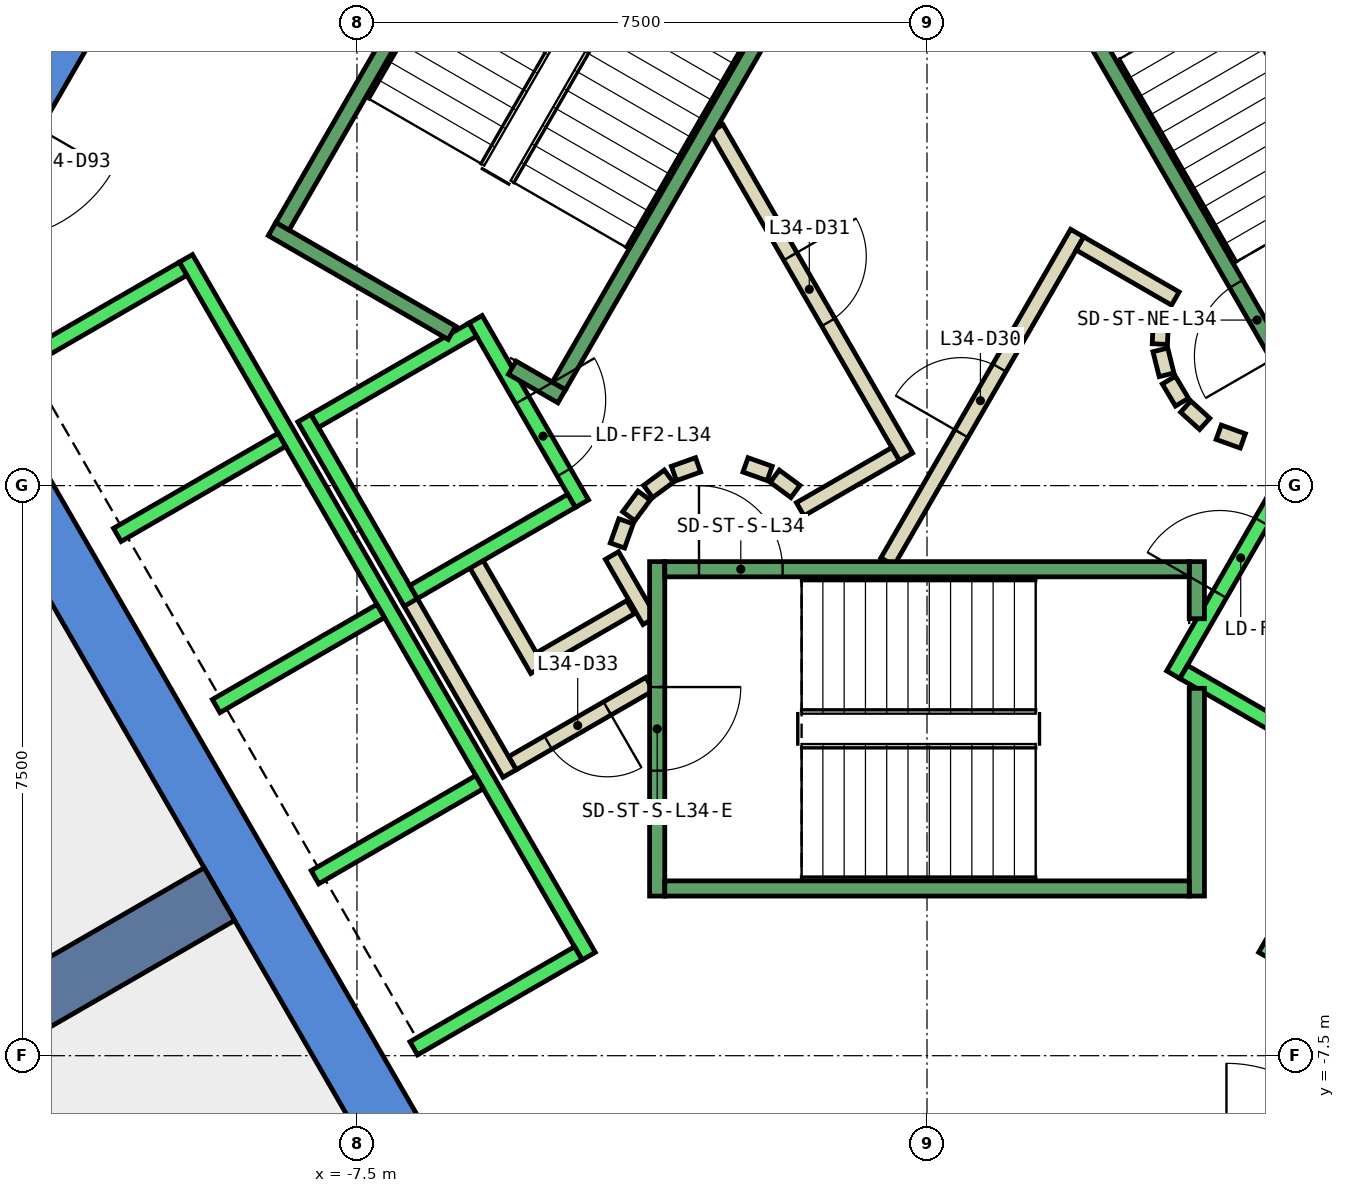
"""IFC4 building model, lengths in metres.
Left out: names, types, materials, properties, quantities, classifications, styles, units other than length and angle.
Written with IfcOpenShell. Run it as: python <this file> out.ifc"""

import sys

from ifc_helpers import new_model, si_unit, direction, frame, frame_2d, origin, place, context, subcontext, project, spatial, polyline, rectangle, outline, extrude, element, fill, save


model = new_model("IFC4")
c1 = context("Model", 3, precision=1e-05, world=origin(), true_north=direction((0.0, 1.0)))
c2 = subcontext(c1, "Body", "Model", "MODEL_VIEW")
j1 = project(units=[si_unit("LENGTHUNIT", "METRE"), si_unit("PLANEANGLEUNIT", "RADIAN")], contexts=[c1])
p1 = place(None, origin())
s1 = spatial("IfcSite", under=j1, at=p1, CompositionType="ELEMENT")
p2 = place(p1, origin())
s2 = spatial("IfcBuilding", under=s1, at=p2, CompositionType="ELEMENT")
p3 = place(p2, frame((0.0, 0.0, 155.0)))
s3 = spatial("IfcBuildingStorey", under=s2, at=p3, CompositionType="ELEMENT", Elevation=155.0)
p4 = place(p3, frame((0.0, 0.0, -0.4)))
e1 = element("IfcWall", 1, at=p4, inside=s3, PredefinedType="SHEAR", context=c2, shape_type="SweptSolid", body=[
    extrude(outline(polyline([(-12.267, 5.252), (-11.575, 4.852), (-6.466, 13.7), (-6.928, 14.5), (-12.267, 5.252)])), origin(), (0.0, 0.0, 1.0), 4.2),
])
p5 = place(p3, frame((0.0, 0.0, -0.4)))
e2 = element("IfcWall", 2, at=p5, inside=s3, PredefinedType="SHEAR", context=c2, shape_type="SweptSolid", body=[
    extrude(outline(polyline([(-13.856, 2.5), (-6.928, -9.5), (-6.466, -8.7), (-12.933, 2.5), (-13.856, 2.5)])), origin(), (0.0, 0.0, 1.0), 4.2),
])
p6 = place(p3, frame((-9.31, -5.375, -0.4), z_axis=(0.0, 0.0, 1.0), x_axis=(-0.866017533419, -0.500013631625, 0.0)))
e3 = element("IfcWall", 3, at=p6, inside=s3, PredefinedType="SHEAR", context=c2, shape_type="SweptSolid", body=[
    extrude(rectangle(XDim=9.0, YDim=0.8, at=frame_2d((4.5, 0.0))), origin(), (0.0, 0.0, 1.0), 4.2),
])
p7 = place(p3, frame((-3.9, -1.599, 0.0), z_axis=(0.0, 0.0, 1.0), x_axis=(-0.865969445389, -0.500096910261, 0.0)))
e4 = element("IfcWall", 4, at=p7, inside=s3, PredefinedType="PARTITIONING", context=c2, shape_type="SweptSolid", body=[
    extrude(rectangle(XDim=1.373, YDim=0.2, at=frame_2d((0.687, 0.0))), origin(), (0.0, 0.0, 1.0), 3.8),
])
p8 = place(p3, frame((-5.126, -2.422, 0.0), z_axis=(0.0, 0.0, 1.0), x_axis=(-0.500062241894, 0.865989465428, 0.0)))
e5 = element("IfcWall", 5, at=p8, inside=s3, PredefinedType="PARTITIONING", context=c2, shape_type="SweptSolid", body=[
    extrude(rectangle(XDim=1.7, YDim=0.2, at=frame_2d((0.85, 0.0))), origin(), (0.0, 0.0, 1.0), 3.8),
])
p9 = place(p3, frame((-3.65, -2.61, 0.0), z_axis=(0.0, 0.0, 1.0), x_axis=(-0.866072462134, -0.499918483688, 0.0)))
e6 = element("IfcWall", 6, at=p9, inside=s3, PredefinedType="PARTITIONING", context=c2, shape_type="SweptSolid", body=[
    extrude(rectangle(XDim=2.084, YDim=0.2, at=frame_2d((1.042, 0.0))), origin(), (0.0, 0.0, 1.0), 3.8),
])
p10 = place(p9, frame((0.642, 0.0, 0.0)))
e7 = element("IfcOpeningElement", 7, at=p10, cuts=e6, PredefinedType="OPENING", context=c2, shape_type="SweptSolid", body=[
    extrude(rectangle(XDim=0.9, YDim=2.1, at=frame_2d((0.45, 1.05))), frame((0.0, 0.11, 0.0), z_axis=(0.0, -1.0, 0.0), x_axis=(1.0, 0.0, 0.0)), (0.0, 0.0, 1.0), 0.22),
])
p11 = place(p3, frame((-5.492, -3.788, 0.0), z_axis=(0.0, 0.0, 1.0), x_axis=(-0.500008949224, 0.866020236886, 0.0)))
e8 = element("IfcWall", 8, at=p11, inside=s3, PredefinedType="PARTITIONING", context=c2, shape_type="SweptSolid", body=[
    extrude(rectangle(XDim=2.68, YDim=0.2, at=frame_2d((1.34, 0.0))), origin(), (0.0, 0.0, 1.0), 3.8),
])
p12 = place(p3, frame((-4.145, -0.92, 0.0), z_axis=(0.0, 0.0, 1.0), x_axis=(0.499743786207, -0.866173278362, 0.0)))
e9 = element("IfcWall", 9, at=p12, inside=s3, PredefinedType="PARTITIONING", context=c2, shape_type="SweptSolid", body=[
    extrude(rectangle(XDim=0.991, YDim=0.2, at=frame_2d((0.495, 0.0))), origin(), (0.0, 0.0, 1.0), 3.8),
])
p13 = place(p3, frame((-0.52, -1.0, 0.0), z_axis=(0.0, 0.0, 1.0), x_axis=(0.50011622646, 0.865958290007, 0.0)))
e10 = element("IfcWall", 10, at=p13, inside=s3, PredefinedType="PARTITIONING", context=c2, shape_type="SweptSolid", body=[
    extrude(rectangle(XDim=4.991, YDim=0.2, at=frame_2d((2.496, 0.0))), origin(), (0.0, 0.0, 1.0), 3.8),
])
p14 = place(p13, frame((1.945, 0.0, 0.0)))
e11 = element("IfcOpeningElement", 11, at=p14, cuts=e10, PredefinedType="OPENING", context=c2, shape_type="SweptSolid", body=[
    extrude(rectangle(XDim=1.0, YDim=2.1, at=frame_2d((0.5, 1.05))), frame((0.0, 0.11, 0.0), z_axis=(0.0, -1.0, 0.0), x_axis=(1.0, 0.0, 0.0)), (0.0, 0.0, 1.0), 0.22),
])
p15 = place(p3, frame((2.012, 3.186, 0.0), z_axis=(0.0, 0.0, 1.0), x_axis=(0.865891012941, -0.500232699559, 0.0)))
e12 = element("IfcWall", 12, at=p15, inside=s3, PredefinedType="PARTITIONING", context=c2, shape_type="SweptSolid", body=[
    extrude(rectangle(XDim=1.449, YDim=0.2, at=frame_2d((0.725, 0.0))), origin(), (0.0, 0.0, 1.0), 3.8),
])
p16 = place(p3, frame((3.079, 2.199, 0.0), z_axis=(0.0, 0.0, 1.0), x_axis=(-0.047771483479, -0.998858290933, 0.0)))
e13 = element("IfcWall", 13, at=p16, inside=s3, PredefinedType="PARTITIONING", context=c2, shape_type="SweptSolid", body=[
    extrude(rectangle(XDim=0.337, YDim=0.2, at=frame_2d((0.169, 0.0))), origin(), (0.0, 0.0, 1.0), 3.8),
])
p17 = place(p3, frame((3.07, 1.786, 0.0), z_axis=(0.0, 0.0, 1.0), x_axis=(0.242705583207, -0.970099994784, 0.0)))
e14 = element("IfcWall", 14, at=p17, inside=s3, PredefinedType="PARTITIONING", context=c2, shape_type="SweptSolid", body=[
    extrude(rectangle(XDim=0.338, YDim=0.2, at=frame_2d((0.169, 0.0))), origin(), (0.0, 0.0, 1.0), 3.8),
])
for number, where, z_axis, x_axis in (
    (15, (3.182, 1.388, 0.0), (0.0, 0.0, 1.0), (0.512, -0.859, 0.0)),
    (16, (3.404, 1.039, 0.0), (0.0, 0.0, 1.0), (0.74, -0.672, 0.0)),
):
    element("IfcWall", number, at=place(p3, frame(where, z_axis=z_axis, x_axis=x_axis)), inside=s3, PredefinedType="PARTITIONING", context=c2, shape_type="SweptSolid", body=[
        extrude(rectangle(XDim=0.338, YDim=0.2, at=frame_2d((0.169, 0.0))), origin(), (0.0, 0.0, 1.0), 3.8),
    ])
p18 = place(p3, frame((3.838, 0.702, 0.0), z_axis=(0.0, 0.0, 1.0), x_axis=(0.941035081519, -0.338308993895, 0.0)))
e17 = element("IfcWall", 17, at=p18, inside=s3, PredefinedType="PARTITIONING", context=c2, shape_type="SweptSolid", body=[
    extrude(rectangle(XDim=0.337, YDim=0.2, at=frame_2d((0.168, 0.0))), origin(), (0.0, 0.0, 1.0), 3.8),
])
p19 = place(p3, frame((-2.771, 4.7, 0.0), z_axis=(0.0, 0.0, 1.0), x_axis=(0.499969479948, -0.866043023828, 0.0)))
e18 = element("IfcWall", 18, at=p19, inside=s3, PredefinedType="PARTITIONING", context=c2, shape_type="SweptSolid", body=[
    extrude(rectangle(XDim=4.99, YDim=0.2, at=frame_2d((2.495, 0.0))), origin(), (0.0, 0.0, 1.0), 3.8),
])
p20 = place(p19, frame((1.945, 0.0, 0.0)))
e19 = element("IfcOpeningElement", 19, at=p20, cuts=e18, PredefinedType="OPENING", context=c2, shape_type="SweptSolid", body=[
    extrude(rectangle(XDim=1.0, YDim=2.1, at=frame_2d((0.5, 1.05))), frame((0.0, 0.11, 0.0), z_axis=(0.0, -1.0, 0.0), x_axis=(1.0, 0.0, 0.0)), (0.0, 0.0, 1.0), 0.22),
])
p21 = place(p3, frame((-0.412, 0.414, 0.0), z_axis=(0.0, 0.0, 1.0), x_axis=(-0.866017369001, -0.500013916395, 0.0)))
e20 = element("IfcWall", 20, at=p21, inside=s3, PredefinedType="PARTITIONING", context=c2, shape_type="SweptSolid", body=[
    extrude(rectangle(XDim=1.45, YDim=0.2, at=frame_2d((0.725, 0.0))), origin(), (0.0, 0.0, 1.0), 3.8),
])
p22 = place(p3, frame((-1.731, -0.077, 0.0), z_axis=(0.0, 0.0, 1.0), x_axis=(-0.804311165252, 0.594208338422, 0.0)))
e21 = element("IfcWall", 21, at=p22, inside=s3, PredefinedType="PARTITIONING", context=c2, shape_type="SweptSolid", body=[
    extrude(rectangle(XDim=0.338, YDim=0.2, at=frame_2d((0.169, 0.0))), origin(), (0.0, 0.0, 1.0), 3.8),
])
p23 = place(p3, frame((-2.07, 0.16, 0.0), z_axis=(0.0, 0.0, 1.0), x_axis=(-0.942199461132, 0.335052496547, 0.0)))
e22 = element("IfcWall", 22, at=p23, inside=s3, PredefinedType="PARTITIONING", context=c2, shape_type="SweptSolid", body=[
    extrude(rectangle(XDim=0.337, YDim=0.2, at=frame_2d((0.169, 0.0))), origin(), (0.0, 0.0, 1.0), 3.8),
])
p24 = place(p3, frame((-3.012, 0.273, 0.0), z_axis=(0.0, 0.0, 1.0), x_axis=(-0.942280615813, -0.334824194261, 0.0)))
e23 = element("IfcWall", 23, at=p24, inside=s3, PredefinedType="PARTITIONING", context=c2, shape_type="SweptSolid", body=[
    extrude(rectangle(XDim=0.338, YDim=0.2, at=frame_2d((0.169, 0.0))), origin(), (0.0, 0.0, 1.0), 3.8),
])
p25 = place(p3, frame((-3.397, 0.124, 0.0), z_axis=(0.0, 0.0, 1.0), x_axis=(-0.804311165252, -0.594208338422, 0.0)))
e24 = element("IfcWall", 24, at=p25, inside=s3, PredefinedType="PARTITIONING", context=c2, shape_type="SweptSolid", body=[
    extrude(rectangle(XDim=0.338, YDim=0.2, at=frame_2d((0.169, 0.0))), origin(), (0.0, 0.0, 1.0), 3.8),
])
p26 = place(p3, frame((-3.723, -0.131, 0.0), z_axis=(0.0, 0.0, 1.0), x_axis=(-0.594675113454, -0.803966112121, 0.0)))
e25 = element("IfcWall", 25, at=p26, inside=s3, PredefinedType="PARTITIONING", context=c2, shape_type="SweptSolid", body=[
    extrude(rectangle(XDim=0.338, YDim=0.2, at=frame_2d((0.169, 0.0))), origin(), (0.0, 0.0, 1.0), 3.8),
])
p27 = place(p3, frame((-3.96, -0.47, 0.0), z_axis=(0.0, 0.0, 1.0), x_axis=(-0.334824194261, -0.942280615813, 0.0)))
e26 = element("IfcWall", 26, at=p27, inside=s3, PredefinedType="PARTITIONING", context=c2, shape_type="SweptSolid", body=[
    extrude(rectangle(XDim=0.338, YDim=0.2, at=frame_2d((0.169, 0.0))), origin(), (0.0, 0.0, 1.0), 3.8),
])
p28 = place(p3, frame((-5.94, 2.188, 0.0), z_axis=(0.0, 0.0, 1.0), x_axis=(0.49994636267, -0.866056369097, 0.0)))
e27 = element("IfcWall", 27, at=p28, inside=s3, PredefinedType="STANDARD", context=c2, shape_type="SweptSolid", body=[
    extrude(rectangle(XDim=2.8, YDim=0.2, at=frame_2d((1.4, 0.0))), origin(), (0.0, 0.0, 1.0), 3.8),
])
p29 = place(p28, frame((1.225, 0.0, 0.0)))
e28 = element("IfcOpeningElement", 28, at=p29, cuts=e27, PredefinedType="OPENING", context=c2, shape_type="SweptSolid", body=[
    extrude(rectangle(XDim=1.1, YDim=2.1, at=frame_2d((0.55, 1.05))), frame((0.0, 0.11, 0.0), z_axis=(0.0, -1.0, 0.0), x_axis=(1.0, 0.0, 0.0)), (0.0, 0.0, 1.0), 0.22),
])
p30 = place(p3, frame((-8.192, 0.888, 0.0), z_axis=(0.0, 0.0, 1.0), x_axis=(0.49994636267, -0.866056369097, 0.0)))
e29 = element("IfcWall", 29, at=p30, inside=s3, PredefinedType="STANDARD", context=c2, shape_type="SweptSolid", body=[
    extrude(rectangle(XDim=2.8, YDim=0.2, at=frame_2d((1.4, 0.0))), origin(), (0.0, 0.0, 1.0), 3.8),
])
for number, where, z_axis, x_axis in (
    (30, (-5.977, 2.052, 0.0), (0.0, 0.0, 1.0), (-0.866, -0.5, 0.0)),
    (31, (-4.677, -0.2, 0.0), (0.0, 0.0, 1.0), (-0.866, -0.5, 0.0)),
):
    element("IfcWall", number, at=place(p3, frame(where, z_axis=z_axis, x_axis=x_axis)), inside=s3, PredefinedType="STANDARD", context=c2, shape_type="SweptSolid", body=[
        extrude(rectangle(XDim=2.399, YDim=0.2, at=frame_2d((1.2, 0.0))), origin(), (0.0, 0.0, 1.0), 3.8),
    ])
p31 = place(p3, frame((-9.751, 2.99, 0.0), z_axis=(0.0, 0.0, 1.0), x_axis=(0.50000090737, -0.866024879913, 0.0)))
e32 = element("IfcWall", 32, at=p31, inside=s3, PredefinedType="STANDARD", context=c2, shape_type="SweptSolid", body=[
    extrude(rectangle(XDim=10.6, YDim=0.2, at=frame_2d((5.3, 0.0))), origin(), (0.0, 0.0, 1.0), 3.8),
])
p32 = place(p3, frame((-9.788, 2.853, 0.0), z_axis=(0.0, 0.0, 1.0), x_axis=(-0.865998541277, -0.500046524342, 0.0)))
e33 = element("IfcWall", 33, at=p32, inside=s3, PredefinedType="STANDARD", context=c2, shape_type="SweptSolid", body=[
    extrude(rectangle(XDim=2.5, YDim=0.2, at=frame_2d((1.25, 0.0))), origin(), (0.0, 0.0, 1.0), 3.8),
])
for number, where, z_axis, x_axis in (
    (34, (-8.488, 0.602, 0.0), (0.0, 0.0, 1.0), (-0.866, -0.5, 0.0)),
    (35, (-7.188, -1.65, 0.0), (0.0, 0.0, 1.0), (-0.866, -0.5, 0.0)),
    (36, (-5.888, -3.902, 0.0), (0.0, 0.0, 1.0), (-0.866, -0.5, 0.0)),
    (37, (-4.588, -6.153, 0.0), (0.0, 0.0, 1.0), (-0.866, -0.5, 0.0)),
):
    element("IfcWall", number, at=place(p3, frame(where, z_axis=z_axis, x_axis=x_axis)), inside=s3, PredefinedType="STANDARD", context=c2, shape_type="SweptSolid", body=[
        extrude(rectangle(XDim=2.5, YDim=0.2, at=frame_2d((1.25, 0.0))), origin(), (0.0, 0.0, 1.0), 3.8),
    ])
p33 = place(p3, frame((3.24, -2.488, 0.0), z_axis=(0.0, 0.0, 1.0), x_axis=(0.49994636267, 0.866056369097, 0.0)))
e38 = element("IfcWall", 38, at=p33, inside=s3, PredefinedType="STANDARD", context=c2, shape_type="SweptSolid", body=[
    extrude(rectangle(XDim=2.8, YDim=0.2, at=frame_2d((1.4, 0.0))), origin(), (0.0, 0.0, 1.0), 3.8),
])
p34 = place(p33, frame((1.225, 0.0, 0.0)))
e39 = element("IfcOpeningElement", 39, at=p34, cuts=e38, PredefinedType="OPENING", context=c2, shape_type="SweptSolid", body=[
    extrude(rectangle(XDim=1.1, YDim=2.1, at=frame_2d((0.55, 1.05))), frame((0.0, 0.11, 0.0), z_axis=(0.0, -1.0, 0.0), x_axis=(1.0, 0.0, 0.0)), (0.0, 0.0, 1.0), 0.22),
])
p35 = place(p3, frame((3.377, -2.452, 0.0), z_axis=(0.0, 0.0, 1.0), x_axis=(0.865955154139, -0.50012165622, 0.0)))
e40 = element("IfcWall", 40, at=p35, inside=s3, PredefinedType="STANDARD", context=c2, shape_type="SweptSolid", body=[
    extrude(rectangle(XDim=2.4, YDim=0.2, at=frame_2d((1.2, 0.0))), origin(), (0.0, 0.0, 1.0), 3.8),
])
p36 = place(p3, frame((4.451, -6.19, 0.0), z_axis=(0.0, 0.0, 1.0), x_axis=(0.50000090737, 0.866024879913, 0.0)))
e41 = element("IfcWall", 41, at=p36, inside=s3, PredefinedType="STANDARD", context=c2, shape_type="SweptSolid", body=[
    extrude(rectangle(XDim=10.6, YDim=0.2, at=frame_2d((5.3, 0.0))), origin(), (0.0, 0.0, 1.0), 3.8),
])
p37 = place(p3, frame((-3.55, -1.0, 0.0), z_axis=(0.0, 0.0, 1.0), x_axis=(0.0, -1.0, 0.0)))
e42 = element("IfcWall", 42, at=p37, inside=s3, PredefinedType="STANDARD", context=c2, shape_type="SweptSolid", body=[
    extrude(rectangle(XDim=4.4, YDim=0.2, at=frame_2d((2.2, 0.0))), origin(), (0.0, 0.0, 1.0), 3.8),
])
p38 = place(p37, frame((1.65, 0.0, 0.0)))
e43 = element("IfcOpeningElement", 43, at=p38, cuts=e42, PredefinedType="OPENING", context=c2, shape_type="SweptSolid", body=[
    extrude(rectangle(XDim=1.1, YDim=2.2, at=frame_2d((0.55, 1.1))), frame((0.0, 0.11, 0.0), z_axis=(0.0, -1.0, 0.0), x_axis=(1.0, 0.0, 0.0)), (0.0, 0.0, 1.0), 0.22),
])
p39 = place(p3, frame((3.55, -2.667, 0.0), z_axis=(0.0, 0.0, 1.0), x_axis=(0.0, -1.0, 0.0)))
e44 = element("IfcWall", 44, at=p39, inside=s3, PredefinedType="STANDARD", context=c2, shape_type="SweptSolid", body=[
    extrude(rectangle(XDim=2.733, YDim=0.2, at=frame_2d((1.366, 0.0))), origin(), (0.0, 0.0, 1.0), 3.8),
])
p40 = place(p3, frame((3.55, -1.0, 0.0), z_axis=(0.0, 0.0, 1.0), x_axis=(0.0, -1.0, 0.0)))
e45 = element("IfcWall", 45, at=p40, inside=s3, PredefinedType="STANDARD", context=c2, shape_type="SweptSolid", body=[
    extrude(rectangle(XDim=0.751, YDim=0.2, at=frame_2d((0.375, 0.0))), origin(), (0.0, 0.0, 1.0), 3.8),
])
p41 = place(p3, frame((-3.45, -1.1, 0.0), z_axis=(0.0, 0.0, 1.0), x_axis=(1.0, 0.0, 0.0)))
e46 = element("IfcWall", 46, at=p41, inside=s3, PredefinedType="STANDARD", context=c2, shape_type="SweptSolid", body=[
    extrude(rectangle(XDim=6.9, YDim=0.2, at=frame_2d((3.45, 0.0))), origin(), (0.0, 0.0, 1.0), 3.8),
])
p42 = place(p41, frame((0.45, 0.0, 0.0)))
e47 = element("IfcOpeningElement", 47, at=p42, cuts=e46, PredefinedType="OPENING", context=c2, shape_type="SweptSolid", body=[
    extrude(rectangle(XDim=1.1, YDim=2.2, at=frame_2d((0.55, 1.1))), frame((0.0, 0.11, 0.0), z_axis=(0.0, -1.0, 0.0), x_axis=(1.0, 0.0, 0.0)), (0.0, 0.0, 1.0), 0.22),
])
p43 = place(p3, frame((-3.45, -5.3, 0.0), z_axis=(0.0, 0.0, 1.0), x_axis=(1.0, 0.0, 0.0)))
e48 = element("IfcWall", 48, at=p43, inside=s3, PredefinedType="STANDARD", context=c2, shape_type="SweptSolid", body=[
    extrude(rectangle(XDim=6.9, YDim=0.2, at=frame_2d((3.45, 0.0))), origin(), (0.0, 0.0, 1.0), 3.8),
])
p44 = place(p3, frame((4.843, 1.312, 0.0), z_axis=(0.0, 0.0, 1.0), x_axis=(-0.499963383562, 0.866046543262, 0.0)))
e49 = element("IfcWall", 49, at=p44, inside=s3, PredefinedType="STANDARD", context=c2, shape_type="SweptSolid", body=[
    extrude(rectangle(XDim=6.9, YDim=0.2, at=frame_2d((3.45, 0.0))), origin(), (0.0, 0.0, 1.0), 3.8),
])
p45 = place(p44, frame((0.45, 0.0, 0.0)))
e50 = element("IfcOpeningElement", 50, at=p45, cuts=e49, PredefinedType="OPENING", context=c2, shape_type="SweptSolid", body=[
    extrude(rectangle(XDim=1.1, YDim=2.2, at=frame_2d((0.55, 1.1))), frame((0.0, 0.11, 0.0), z_axis=(0.0, -1.0, 0.0), x_axis=(1.0, 0.0, 0.0)), (0.0, 0.0, 1.0), 0.22),
])
p46 = place(p3, frame((-6.25, 2.01, 0.0), z_axis=(0.0, 0.0, 1.0), x_axis=(-0.86611865017, 0.499838457731, 0.0)))
e51 = element("IfcWall", 51, at=p46, inside=s3, PredefinedType="STANDARD", context=c2, shape_type="SweptSolid", body=[
    extrude(rectangle(XDim=2.733, YDim=0.2, at=frame_2d((1.366, 0.0))), origin(), (0.0, 0.0, 1.0), 3.8),
])
p47 = place(p3, frame((-4.806, 1.176, 0.0), z_axis=(0.0, 0.0, 1.0), x_axis=(-0.866558586415, 0.499075361355, 0.0)))
e52 = element("IfcWall", 52, at=p47, inside=s3, PredefinedType="STANDARD", context=c2, shape_type="SweptSolid", body=[
    extrude(rectangle(XDim=0.751, YDim=0.2, at=frame_2d((0.376, 0.0))), origin(), (0.0, 0.0, 1.0), 3.8),
])
p48 = place(p3, frame((-1.393, 7.288, 0.0), z_axis=(0.0, 0.0, 1.0), x_axis=(-0.499963383562, -0.866046543262, 0.0)))
e53 = element("IfcWall", 53, at=p48, inside=s3, PredefinedType="STANDARD", context=c2, shape_type="SweptSolid", body=[
    extrude(rectangle(XDim=6.9, YDim=0.2, at=frame_2d((3.45, 0.0))), origin(), (0.0, 0.0, 1.0), 3.8),
])
p49 = place(p48, frame((0.45, 0.0, 0.0)))
e54 = element("IfcOpeningElement", 54, at=p49, cuts=e53, PredefinedType="OPENING", context=c2, shape_type="SweptSolid", body=[
    extrude(rectangle(XDim=1.1, YDim=2.2, at=frame_2d((0.55, 1.1))), frame((0.0, 0.11, 0.0), z_axis=(0.0, -1.0, 0.0), x_axis=(1.0, 0.0, 0.0)), (0.0, 0.0, 1.0), 0.22),
])
p50 = place(p3, frame((-5.03, 9.388, 0.0), z_axis=(0.0, 0.0, 1.0), x_axis=(-0.499978703459, -0.866037698999, 0.0)))
e55 = element("IfcWall", 55, at=p50, inside=s3, PredefinedType="STANDARD", context=c2, shape_type="SweptSolid", body=[
    extrude(rectangle(XDim=6.9, YDim=0.2, at=frame_2d((3.45, 0.0))), origin(), (0.0, 0.0, 1.0), 3.8),
])
p51 = place(p14, origin())
e56 = element("IfcDoor", 56, at=p51, inside=s3, OperationType="SINGLE_SWING_LEFT", PredefinedType="DOOR", context=c2, shape_type="SweptSolid", body=[
    extrude(rectangle(XDim=1.0, YDim=2.1, at=frame_2d((0.5, 1.05))), frame((0.0, 0.025, 0.0), z_axis=(0.0, -1.0, 0.0), x_axis=(1.0, 0.0, 0.0)), (0.0, 0.0, 1.0), 0.05),
])
fill(e11, e56)
p52 = place(p20, origin())
e57 = element("IfcDoor", 57, at=p52, inside=s3, OperationType="SINGLE_SWING_RIGHT", PredefinedType="DOOR", context=c2, shape_type="SweptSolid", body=[
    extrude(rectangle(XDim=1.0, YDim=2.1, at=frame_2d((0.5, 1.05))), frame((0.0, 0.025, 0.0), z_axis=(0.0, -1.0, 0.0), x_axis=(1.0, 0.0, 0.0)), (0.0, 0.0, 1.0), 0.05),
])
fill(e19, e57)
p53 = place(p10, origin())
e58 = element("IfcDoor", 58, at=p53, inside=s3, OperationType="SINGLE_SWING_LEFT", PredefinedType="DOOR", context=c2, shape_type="SweptSolid", body=[
    extrude(rectangle(XDim=0.9, YDim=2.1, at=frame_2d((0.45, 1.05))), frame((0.0, 0.025, 0.0), z_axis=(0.0, -1.0, 0.0), x_axis=(1.0, 0.0, 0.0)), (0.0, 0.0, 1.0), 0.05),
])
fill(e7, e58)
p54 = place(p34, origin())
e59 = element("IfcDoor", 59, at=p54, inside=s3, OperationType="SLIDING_TO_LEFT", PredefinedType="DOOR", context=c2, shape_type="SweptSolid", body=[
    extrude(rectangle(XDim=1.1, YDim=2.1, at=frame_2d((0.55, 1.05))), frame((0.0, 0.025, 0.0), z_axis=(0.0, -1.0, 0.0), x_axis=(1.0, 0.0, 0.0)), (0.0, 0.0, 1.0), 0.05),
])
fill(e39, e59)
p55 = place(p29, origin())
e60 = element("IfcDoor", 60, at=p55, inside=s3, OperationType="SLIDING_TO_LEFT", PredefinedType="DOOR", context=c2, shape_type="SweptSolid", body=[
    extrude(rectangle(XDim=1.1, YDim=2.1, at=frame_2d((0.55, 1.05))), frame((0.0, 0.025, 0.0), z_axis=(0.0, -1.0, 0.0), x_axis=(1.0, 0.0, 0.0)), (0.0, 0.0, 1.0), 0.05),
])
fill(e28, e60)
p56 = place(p42, origin())
e61 = element("IfcDoor", 61, at=p56, inside=s3, OperationType="SINGLE_SWING_LEFT", PredefinedType="DOOR", context=c2, shape_type="SweptSolid", body=[
    extrude(rectangle(XDim=1.1, YDim=2.2, at=frame_2d((0.55, 1.1))), frame((0.0, 0.025, 0.0), z_axis=(0.0, -1.0, 0.0), x_axis=(1.0, 0.0, 0.0)), (0.0, 0.0, 1.0), 0.05),
])
fill(e47, e61)
p57 = place(p38, origin())
e62 = element("IfcDoor", 62, at=p57, inside=s3, OperationType="SINGLE_SWING_LEFT", PredefinedType="DOOR", context=c2, shape_type="SweptSolid", body=[
    extrude(rectangle(XDim=1.1, YDim=2.2, at=frame_2d((0.55, 1.1))), frame((0.0, 0.025, 0.0), z_axis=(0.0, -1.0, 0.0), x_axis=(1.0, 0.0, 0.0)), (0.0, 0.0, 1.0), 0.05),
])
fill(e43, e62)
p58 = place(p45, origin())
e63 = element("IfcDoor", 63, at=p58, inside=s3, OperationType="SINGLE_SWING_LEFT", PredefinedType="DOOR", context=c2, shape_type="SweptSolid", body=[
    extrude(rectangle(XDim=1.1, YDim=2.2, at=frame_2d((0.55, 1.1))), frame((0.0, 0.025, 0.0), z_axis=(0.0, -1.0, 0.0), x_axis=(1.0, 0.0, 0.0)), (0.0, 0.0, 1.0), 0.05),
])
fill(e50, e63)
save(model, sys.argv[1])
